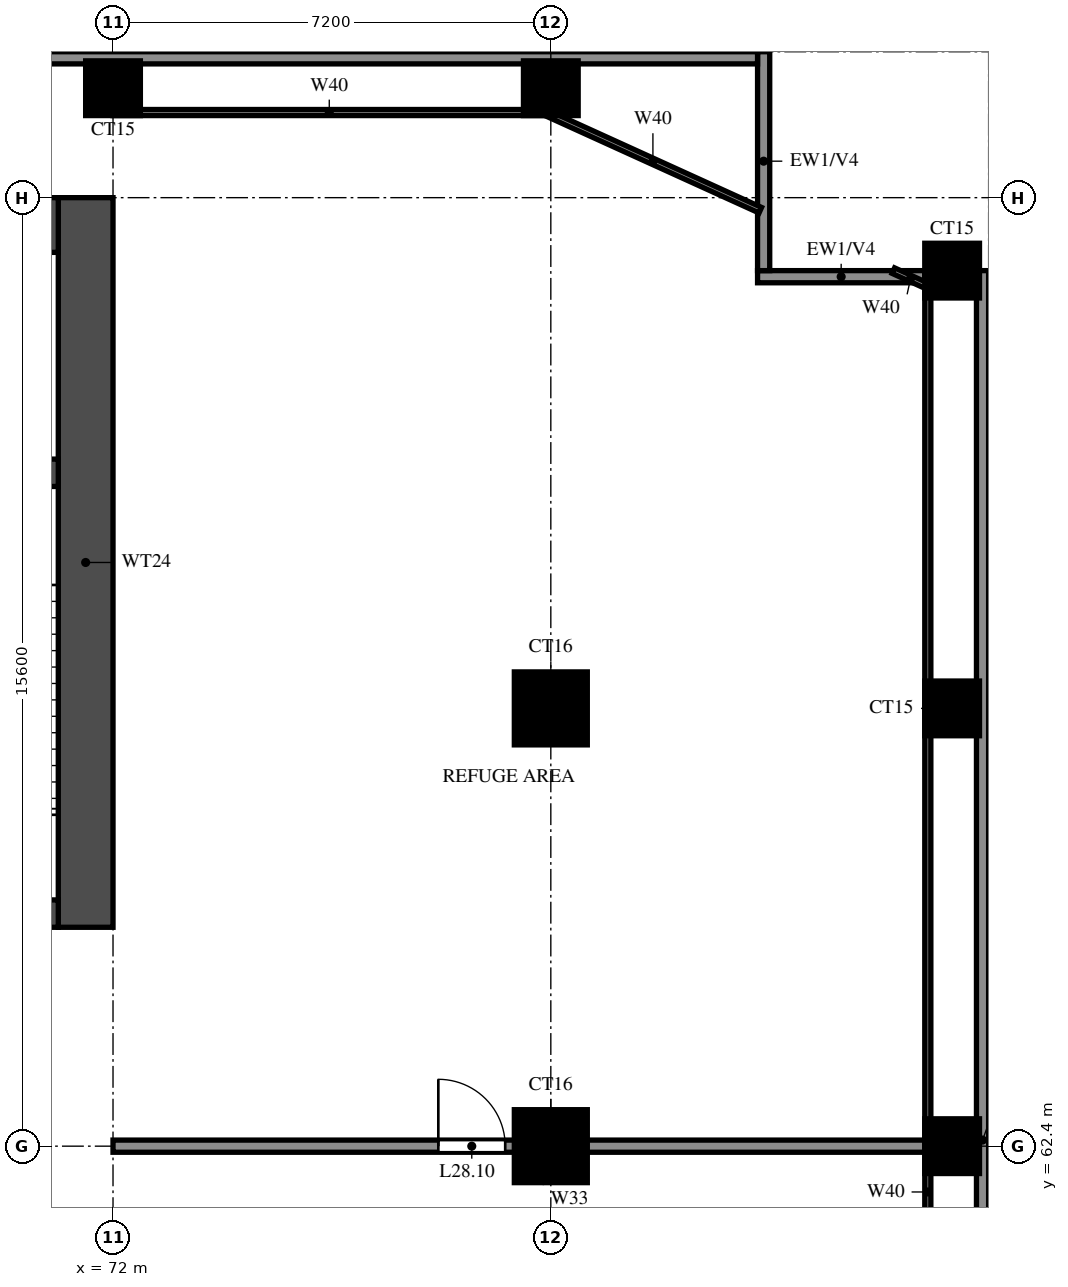
"""IFC4 building model, lengths in metres.
Left out: names, types, materials, properties, quantities, classifications, styles, units other than length and angle.
Written with IfcOpenShell. Run it as: python <this file> out.ifc"""

import sys

from ifc_helpers import new_model, si_unit, direction, frame, frame_2d, origin, origin_2d, place, context, subcontext, project, spatial, rectangle, extrude, source, transform, mapped, element, fill, save


model = new_model("IFC4")
c1 = context("Model", 3, precision=1e-05, world=origin(), true_north=direction((0.0, 1.0)))
c2 = subcontext(c1, "Body", "Model", "MODEL_VIEW")
j1 = project(units=[si_unit("LENGTHUNIT", "METRE"), si_unit("PLANEANGLEUNIT", "RADIAN")], contexts=[c1])
p1 = place(None, origin())
s1 = spatial("IfcSite", under=j1, at=p1, CompositionType="ELEMENT")
p2 = place(p1, origin())
s2 = spatial("IfcBuilding", under=s1, at=p2, CompositionType="ELEMENT")
p3 = place(p2, frame((0.0, 0.0, 107.5)))
s3 = spatial("IfcBuildingStorey", under=s2, at=p3, CompositionType="ELEMENT", Elevation=107.5)
m1 = source(origin(), c2, "Body", "SweptSolid", [
    extrude(rectangle(XDim=1.2, YDim=1.2, at=origin_2d()), origin(), (0.0, 0.0, 1.0), 5.2),
])
p4 = place(p3, frame((79.2, 62.4, 0.0), z_axis=(0.0, 0.0, 1.0), x_axis=(1.0, 0.0, 0.0)))
e1 = element("IfcColumn", 1, at=p4, inside=s3, PredefinedType="COLUMN", context=c2, shape_type="MappedRepresentation", body=[
    mapped(m1, transform((0.0, 0.0, 0.0))),
])
m2 = source(origin(), c2, "Body", "SweptSolid", [
    extrude(rectangle(XDim=0.9, YDim=0.9, at=origin_2d()), origin(), (0.0, 0.0, 1.0), 5.2),
])
p5 = place(p3, frame((85.8, 62.4, 0.0), z_axis=(0.0, 0.0, 1.0), x_axis=(1.0, 0.0, 0.0)))
e2 = element("IfcColumn", 2, at=p5, inside=s3, PredefinedType="COLUMN", context=c2, shape_type="MappedRepresentation", body=[
    mapped(m2, transform((0.0, 0.0, 0.0))),
])
p6 = place(p3, frame((79.2, 69.6, 0.0), z_axis=(0.0, 0.0, 1.0), x_axis=(1.0, 0.0, 0.0)))
e3 = element("IfcColumn", 3, at=p6, inside=s3, PredefinedType="COLUMN", context=c2, shape_type="MappedRepresentation", body=[
    mapped(m1, transform((0.0, 0.0, 0.0))),
])
for number, where, z_axis, x_axis in (
    (4, (85.8, 69.6, 0.0), (0.0, 0.0, 1.0), (1.0, 0.0, 0.0)),
    (5, (85.8, 76.8, 0.0), (0.0, 0.0, 1.0), (1.0, 0.0, 0.0)),
    (6, (72.0, 79.8, 0.0), (0.0, 0.0, 1.0), (1.0, 0.0, 0.0)),
    (7, (79.2, 79.8, 0.0), (0.0, 0.0, 1.0), (1.0, 0.0, 0.0)),
):
    element("IfcColumn", number, at=place(p3, frame(where, z_axis=z_axis, x_axis=x_axis)), inside=s3, PredefinedType="COLUMN", context=c2, shape_type="MappedRepresentation", body=[
        mapped(m2, transform((0.0, 0.0, 0.0))),
    ])
p7 = place(p3, frame((71.55, 66.0, 0.0), z_axis=(0.0, 0.0, 1.0), x_axis=(0.0, 1.0, 0.0)))
e8 = element("IfcWall", 8, at=p7, inside=s3, PredefinedType="SHEAR", context=c2, shape_type="SweptSolid", body=[
    extrude(rectangle(XDim=12.0, YDim=0.9, at=frame_2d((6.0, 0.0))), origin(), (0.0, 0.0, 1.0), 5.2),
])
p8 = place(p3, frame((29.7, 77.55, 0.0), z_axis=(0.0, 0.0, 1.0), x_axis=(1.0, 0.0, 0.0)))
e9 = element("IfcWall", 9, at=p8, inside=s3, PredefinedType="SHEAR", context=c2, shape_type="SweptSolid", body=[
    extrude(rectangle(XDim=41.4, YDim=0.9, at=frame_2d((20.7, 0.0))), origin(), (0.0, 0.0, 1.0), 5.2),
])
p9 = place(p3, frame((29.7, 66.225, 0.0), z_axis=(0.0, 0.0, 1.0), x_axis=(1.0, 0.0, 0.0)))
e10 = element("IfcWall", 10, at=p9, inside=s3, PredefinedType="SHEAR", context=c2, shape_type="SweptSolid", body=[
    extrude(rectangle(XDim=41.4, YDim=0.45, at=frame_2d((20.7, 0.0))), origin(), (0.0, 0.0, 1.0), 5.2),
])
p10 = place(p9, frame((0.925, 0.0, 0.0)))
e11 = element("IfcOpeningElement", 11, at=p10, cuts=e10, PredefinedType="OPENING", context=c2, shape_type="SweptSolid", body=[
    extrude(rectangle(XDim=1.1, YDim=2.1, at=frame_2d((0.55, 1.05))), frame((0.0, 0.235, 0.0), z_axis=(0.0, -1.0, 0.0), x_axis=(1.0, 0.0, 0.0)), (0.0, 0.0, 1.0), 0.47),
])
p11 = place(p9, frame((3.738, 0.0, 0.0)))
e12 = element("IfcOpeningElement", 12, at=p11, cuts=e10, PredefinedType="OPENING", context=c2, shape_type="SweptSolid", body=[
    extrude(rectangle(XDim=1.8, YDim=2.1, at=frame_2d((0.9, 1.05))), frame((0.0, 0.235, 0.0), z_axis=(0.0, -1.0, 0.0), x_axis=(1.0, 0.0, 0.0)), (0.0, 0.0, 1.0), 0.47),
])
p12 = place(p3, frame((67.925, 73.475, 0.0), z_axis=(0.0, 0.0, 1.0), x_axis=(1.0, 0.0, 0.0)))
e13 = element("IfcWall", 13, at=p12, inside=s3, PredefinedType="SHEAR", context=c2, shape_type="SweptSolid", body=[
    extrude(rectangle(XDim=3.175, YDim=0.45, at=frame_2d((1.587, 0.0))), origin(), (0.0, 0.0, 1.0), 5.2),
])
p13 = place(p3, frame((86.3, 48.2, 0.0), z_axis=(0.0, 0.0, 1.0), x_axis=(0.0, 1.0, 0.0)))
e14 = element("IfcWall", 14, at=p13, inside=s3, PredefinedType="SOLIDWALL", context=c2, shape_type="SweptSolid", body=[
    extrude(rectangle(XDim=28.6, YDim=0.2, at=frame_2d((14.3, 0.0))), origin(), (0.0, 0.0, 1.0), 5.2),
])
p14 = place(p3, frame((85.35, 76.7, 0.0), z_axis=(0.0, 0.0, 1.0), x_axis=(-1.0, 0.0, 0.0)))
e15 = element("IfcWall", 15, at=p14, inside=s3, PredefinedType="SOLIDWALL", context=c2, shape_type="SweptSolid", body=[
    extrude(rectangle(XDim=2.75, YDim=0.2, at=frame_2d((1.375, 0.0))), origin(), (0.0, 0.0, 1.0), 5.2),
])
p15 = place(p3, frame((82.7, 76.8, 0.0), z_axis=(0.0, 0.0, 1.0), x_axis=(0.0, 1.0, 0.0)))
e16 = element("IfcWall", 16, at=p15, inside=s3, PredefinedType="SOLIDWALL", context=c2, shape_type="SweptSolid", body=[
    extrude(rectangle(XDim=3.6, YDim=0.2, at=frame_2d((1.8, 0.0))), origin(), (0.0, 0.0, 1.0), 5.2),
])
p16 = place(p3, frame((82.6, 80.3, 0.0), z_axis=(0.0, 0.0, 1.0), x_axis=(-1.0, 0.0, 0.0)))
e17 = element("IfcWall", 17, at=p16, inside=s3, PredefinedType="SOLIDWALL", context=c2, shape_type="SweptSolid", body=[
    extrude(rectangle(XDim=64.6, YDim=0.2, at=frame_2d((32.3, 0.0))), origin(), (0.0, 0.0, 1.0), 5.2),
])
p17 = place(p3, frame((72.0, 62.4, 0.0), z_axis=(0.0, 0.0, 1.0), x_axis=(1.0, 0.0, 0.0)))
e18 = element("IfcWall", 18, at=p17, inside=s3, PredefinedType="SOLIDWALL", context=c2, shape_type="SweptSolid", body=[
    extrude(rectangle(XDim=13.35, YDim=0.2, at=frame_2d((6.675, 0.0))), origin(), (0.0, 0.0, 1.0), 5.2),
])
p18 = place(p17, frame((5.35, 0.0, 0.0)))
e19 = element("IfcOpeningElement", 19, at=p18, cuts=e18, PredefinedType="OPENING", context=c2, shape_type="SweptSolid", body=[
    extrude(rectangle(XDim=1.1, YDim=2.1, at=frame_2d((0.55, 1.05))), frame((0.0, 0.11, 0.0), z_axis=(0.0, -1.0, 0.0), x_axis=(1.0, 0.0, 0.0)), (0.0, 0.0, 1.0), 0.22),
])
p19 = place(p3, frame((72.0, 79.4, 0.0), z_axis=(0.0, 0.0, 1.0), x_axis=(1.0, 0.0, 0.0)))
e20 = element("IfcWall", 20, at=p19, inside=s3, PredefinedType="PARTITIONING", context=c2, shape_type="SweptSolid", body=[
    extrude(rectangle(XDim=7.113, YDim=0.1, at=frame_2d((3.557, 0.0))), origin(), (0.0, 0.0, 1.0), 5.2),
])
p20 = place(p3, frame((85.4, 48.17, 0.0), z_axis=(0.0, 0.0, 1.0), x_axis=(0.0, 1.0, 0.0)))
e21 = element("IfcWall", 21, at=p20, inside=s3, PredefinedType="PARTITIONING", context=c2, shape_type="SweptSolid", body=[
    extrude(rectangle(XDim=28.372, YDim=0.1, at=frame_2d((14.186, 0.0))), origin(), (0.0, 0.0, 1.0), 5.2),
])
p21 = place(p3, frame((82.645, 77.794, 0.0), z_axis=(0.0, 0.0, 1.0), x_axis=(-0.910316907758, 0.413911980316, 0.0)))
e22 = element("IfcWall", 22, at=p21, inside=s3, PredefinedType="PARTITIONING", context=c2, shape_type="SweptSolid", body=[
    extrude(rectangle(XDim=3.88, YDim=0.1, at=frame_2d((1.94, 0.0))), origin(), (0.0, 0.0, 1.0), 5.2),
])
p22 = place(p3, frame((85.4, 76.542, 0.0), z_axis=(0.0, 0.0, 1.0), x_axis=(-0.910138141385, 0.414304916212, 0.0)))
e23 = element("IfcWall", 23, at=p22, inside=s3, PredefinedType="PARTITIONING", context=c2, shape_type="SweptSolid", body=[
    extrude(rectangle(XDim=0.623, YDim=0.1, at=frame_2d((0.312, 0.0))), origin(), (0.0, 0.0, 1.0), 5.2),
])
p23 = place(p18, origin())
e24 = element("IfcDoor", 24, at=p23, inside=s3, OperationType="SINGLE_SWING_LEFT", PredefinedType="DOOR", context=c2, shape_type="SweptSolid", body=[
    extrude(rectangle(XDim=1.1, YDim=2.1, at=frame_2d((0.55, 1.05))), frame((0.0, 0.025, 0.0), z_axis=(0.0, -1.0, 0.0), x_axis=(1.0, 0.0, 0.0)), (0.0, 0.0, 1.0), 0.05),
])
fill(e19, e24)
save(model, sys.argv[1])
